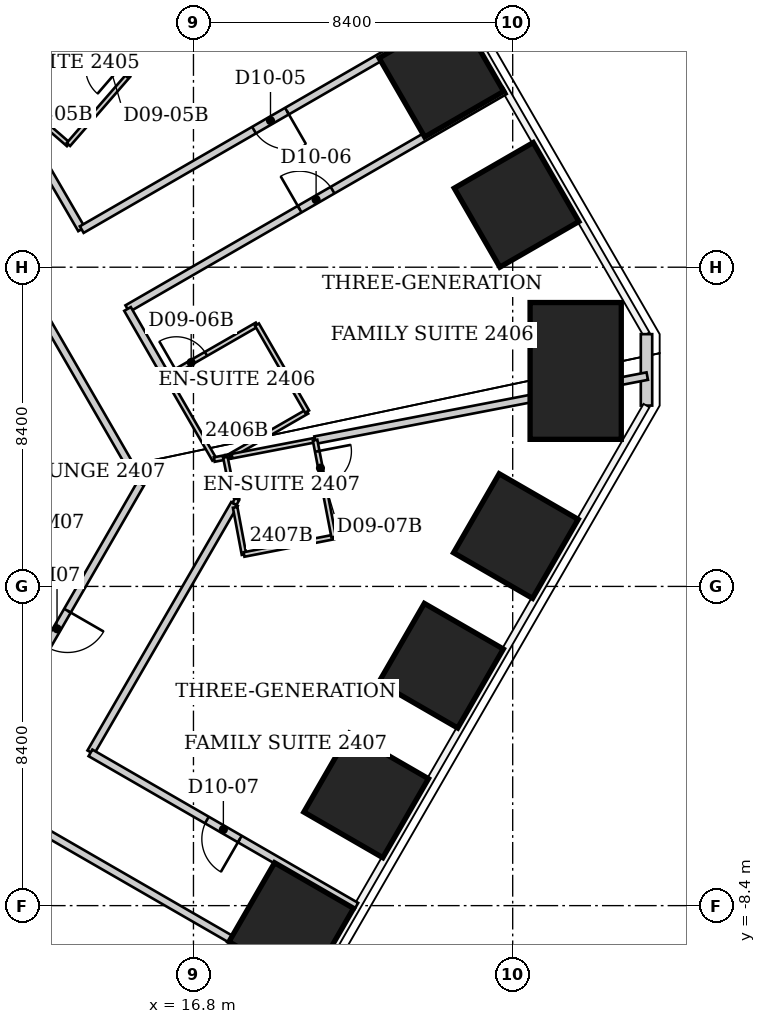
"""IFC4 building model, lengths in metres.
Left out: names, types, materials, properties, quantities, classifications, styles, units other than length and angle.
Written with IfcOpenShell. Run it as: python <this file> out.ifc"""

import sys

from ifc_helpers import new_model, si_unit, direction, frame, frame_2d, origin, origin_2d, place, context, subcontext, project, spatial, rectangle, extrude, element, fill, save


model = new_model("IFC4")
c1 = context("Model", 3, precision=1e-05, world=origin(), true_north=direction((0.0, 1.0)))
c2 = subcontext(c1, "Body", "Model", "MODEL_VIEW")
j1 = project(units=[si_unit("LENGTHUNIT", "METRE"), si_unit("PLANEANGLEUNIT", "RADIAN")], contexts=[c1])
p1 = place(None, origin())
s1 = spatial("IfcSite", under=j1, at=p1, CompositionType="ELEMENT")
p2 = place(p1, origin())
s2 = spatial("IfcBuilding", under=s1, at=p2, CompositionType="ELEMENT")
p3 = place(p2, frame((0.0, 0.0, 100.6)))
s3 = spatial("IfcBuildingStorey", under=s2, at=p3, CompositionType="ELEMENT", Elevation=100.6)
for number, where, z_axis, x_axis in (
    (1, (23.324, 13.466, 0.0), (0.0, 0.0, 1.0), (0.866, 0.5, 0.0)),
    (2, (25.302, 10.041, 0.0), (0.0, 0.0, 1.0), (0.866, 0.5, 0.0)),
):
    element("IfcColumn", number, at=place(p3, frame(where, z_axis=z_axis, x_axis=x_axis)), inside=s3, PredefinedType="COLUMN", context=c2, shape_type="SweptSolid", body=[
        extrude(rectangle(XDim=2.4, YDim=2.4, at=origin_2d()), origin(), (0.0, 0.0, 1.0), 3.8),
    ])
p4 = place(p3, frame((26.857, 5.67, 0.0), z_axis=(0.0, 0.0, 1.0), x_axis=(1.0, 0.0, 0.0)))
e3 = element("IfcColumn", 3, at=p4, inside=s3, PredefinedType="COLUMN", context=c2, shape_type="SweptSolid", body=[
    extrude(rectangle(XDim=2.4, YDim=3.6, at=origin_2d()), origin(), (0.0, 0.0, 1.0), 3.8),
])
for number, where, z_axis, x_axis in (
    (4, (25.284, 1.325, 0.0), (0.0, 0.0, 1.0), (0.866, -0.5, 0.0)),
    (5, (23.314, -2.087, 0.0), (0.0, 0.0, 1.0), (0.866, -0.5, 0.0)),
    (6, (21.344, -5.499, 0.0), (0.0, 0.0, 1.0), (0.866, -0.5, 0.0)),
    (7, (19.374, -8.911, 0.0), (0.0, 0.0, 1.0), (0.866, -0.5, 0.0)),
):
    element("IfcColumn", number, at=place(p3, frame(where, z_axis=z_axis, x_axis=x_axis)), inside=s3, PredefinedType="COLUMN", context=c2, shape_type="SweptSolid", body=[
        extrude(rectangle(XDim=2.4, YDim=2.4, at=origin_2d()), origin(), (0.0, 0.0, 1.0), 3.8),
    ])
p5 = place(p3, frame((28.721, 6.638, 0.0), z_axis=(0.0, 0.0, 1.0), x_axis=(0.0, -1.0, 0.0)))
e8 = element("IfcWall", 8, at=p5, inside=s3, PredefinedType="SOLIDWALL", context=c2, shape_type="SweptSolid", body=[
    extrude(rectangle(XDim=1.88, YDim=0.3, at=frame_2d((0.94, 0.0))), origin(), (0.0, 0.0, 1.0), 3.64),
])
p6 = place(p3, frame((11.01, 10.32, 0.0), z_axis=(0.0, 0.0, 1.0), x_axis=(0.500036278648, -0.866004457284, 0.0)))
e9 = element("IfcWall", 9, at=p6, inside=s3, PredefinedType="PARTITIONING", context=c2, shape_type="SweptSolid", body=[
    extrude(rectangle(XDim=8.799, YDim=0.2, at=frame_2d((4.399, 0.0))), origin(), (0.0, 0.0, 1.0), 3.64),
])
p7 = place(p3, frame((11.55, 13.33, 0.0), z_axis=(0.0, 0.0, 1.0), x_axis=(0.653238965593, 0.75715180369, 0.0)))
e10 = element("IfcWall", 10, at=p7, inside=s3, PredefinedType="PARTITIONING", context=c2, shape_type="SweptSolid", body=[
    extrude(rectangle(XDim=2.404, YDim=0.12, at=frame_2d((1.202, 0.0))), origin(), (0.0, 0.0, 1.0), 3.64),
])
p8 = place(p3, frame((11.55, 13.33, 0.0), z_axis=(0.0, 0.0, 1.0), x_axis=(0.755437535555, -0.655220672655, 0.0)))
e11 = element("IfcWall", 11, at=p8, inside=s3, PredefinedType="PARTITIONING", context=c2, shape_type="SweptSolid", body=[
    extrude(rectangle(XDim=2.594, YDim=0.12, at=frame_2d((1.297, 0.0))), origin(), (0.0, 0.0, 1.0), 3.64),
])
p9 = place(p3, frame((12.899, -6.465, 0.0), z_axis=(0.0, 0.0, 1.0), x_axis=(0.866184578051, -0.499724200681, 0.0)))
e12 = element("IfcWall", 12, at=p9, inside=s3, PredefinedType="PARTITIONING", context=c2, shape_type="SweptSolid", body=[
    extrude(rectangle(XDim=8.064, YDim=0.2, at=frame_2d((4.032, 0.0))), origin(), (0.0, 0.0, 1.0), 3.64),
])
p10 = place(p3, frame((13.51, 11.63, 0.0), z_axis=(0.0, 0.0, 1.0), x_axis=(0.655566599468, 0.75513736079, 0.0)))
e13 = element("IfcWall", 13, at=p10, inside=s3, PredefinedType="PARTITIONING", context=c2, shape_type="SweptSolid", body=[
    extrude(rectangle(XDim=2.41, YDim=0.12, at=frame_2d((1.205, 0.0))), origin(), (0.0, 0.0, 1.0), 3.64),
])
p11 = place(p3, frame((13.855, 9.399, 0.0), z_axis=(0.0, 0.0, 1.0), x_axis=(-0.502087259191, 0.864816965698, 0.0)))
e14 = element("IfcWall", 14, at=p11, inside=s3, PredefinedType="PARTITIONING", context=c2, shape_type="SweptSolid", body=[
    extrude(rectangle(XDim=4.028, YDim=0.2, at=frame_2d((2.014, 0.0))), origin(), (0.0, 0.0, 1.0), 3.64),
])
p12 = place(p3, frame((14.097, -4.367, 0.0), z_axis=(0.0, 0.0, 1.0), x_axis=(0.500859137679, 0.865528811885, 0.0)))
e15 = element("IfcWall", 15, at=p12, inside=s3, PredefinedType="PARTITIONING", context=c2, shape_type="SweptSolid", body=[
    extrude(rectangle(XDim=7.552, YDim=0.2, at=frame_2d((3.776, 0.0))), origin(), (0.0, 0.0, 1.0), 3.64),
])
p13 = place(p3, frame((15.06, 7.31, 0.0), z_axis=(0.0, 0.0, 1.0), x_axis=(0.866042039906, 0.499971184285, 0.0)))
e16 = element("IfcWall", 16, at=p13, inside=s3, PredefinedType="PARTITIONING", context=c2, shape_type="SweptSolid", body=[
    extrude(rectangle(XDim=11.47, YDim=0.2, at=frame_2d((5.735, 0.0))), origin(), (0.0, 0.0, 1.0), 3.64),
])
p14 = place(p13, frame((5.235, 0.0, 0.0)))
e17 = element("IfcOpeningElement", 17, at=p14, cuts=e16, PredefinedType="OPENING", context=c2, shape_type="SweptSolid", body=[
    extrude(rectangle(XDim=1.0, YDim=2.13, at=frame_2d((0.5, 1.065))), frame((0.0, 0.1, 0.0), z_axis=(0.0, -1.0, 0.0), x_axis=(1.0, 0.0, 0.0)), (0.0, 0.0, 1.0), 0.2),
])
p15 = place(p3, frame((15.065, 7.301, 0.0), z_axis=(0.0, 0.0, 1.0), x_axis=(0.498810334238, -0.866711168993, 0.0)))
e18 = element("IfcWall", 18, at=p15, inside=s3, PredefinedType="PARTITIONING", context=c2, shape_type="SweptSolid", body=[
    extrude(rectangle(XDim=2.055, YDim=0.2, at=frame_2d((1.028, 0.0))), origin(), (0.0, 0.0, 1.0), 3.64),
])
p16 = place(p3, frame((15.09, 13.45, 0.0), z_axis=(0.0, 0.0, 1.0), x_axis=(-0.757086659925, 0.653314464377, 0.0)))
e19 = element("IfcWall", 19, at=p16, inside=s3, PredefinedType="PARTITIONING", context=c2, shape_type="SweptSolid", body=[
    extrude(rectangle(XDim=2.602, YDim=0.12, at=frame_2d((1.301, 0.0))), origin(), (0.0, 0.0, 1.0), 3.64),
])
p17 = place(p16, frame((0.3, 0.0, 0.0)))
e20 = element("IfcOpeningElement", 20, at=p17, cuts=e19, PredefinedType="OPENING", context=c2, shape_type="SweptSolid", body=[
    extrude(rectangle(XDim=0.9, YDim=2.03, at=frame_2d((0.45, 1.015))), frame((0.0, 0.06, 0.0), z_axis=(0.0, -1.0, 0.0), x_axis=(1.0, 0.0, 0.0)), (0.0, 0.0, 1.0), 0.12),
])
p18 = place(p3, frame((15.41, 2.7, 0.0), z_axis=(0.0, 0.0, 1.0), x_axis=(-0.499556067326, -0.866281556769, 0.0)))
e21 = element("IfcWall", 21, at=p18, inside=s3, PredefinedType="PARTITIONING", context=c2, shape_type="SweptSolid", body=[
    extrude(rectangle(XDim=8.808, YDim=0.2, at=frame_2d((4.404, 0.0))), origin(), (0.0, 0.0, 1.0), 3.64),
])
p19 = place(p18, frame((3.854, 0.0, 0.0)))
e22 = element("IfcOpeningElement", 22, at=p19, cuts=e21, PredefinedType="OPENING", context=c2, shape_type="SweptSolid", body=[
    extrude(rectangle(XDim=1.1, YDim=2.2, at=frame_2d((0.55, 1.1))), frame((0.0, 0.1, 0.0), z_axis=(0.0, -1.0, 0.0), x_axis=(1.0, 0.0, 0.0)), (0.0, 0.0, 1.0), 0.2),
])
p20 = place(p3, frame((16.09, 5.52, 0.0), z_axis=(0.0, 0.0, 1.0), x_axis=(0.500424596343, -0.865780124151, 0.0)))
e23 = element("IfcWall", 23, at=p20, inside=s3, PredefinedType="PARTITIONING", context=c2, shape_type="SweptSolid", body=[
    extrude(rectangle(XDim=2.518, YDim=0.12, at=frame_2d((1.259, 0.0))), origin(), (0.0, 0.0, 1.0), 3.64),
])
p21 = place(p3, frame((17.582, 3.384, 0.0), z_axis=(0.0, 0.0, 1.0), x_axis=(-0.982006446981, -0.18884739365, 0.0)))
e24 = element("IfcWall", 24, at=p21, inside=s3, PredefinedType="PARTITIONING", context=c2, shape_type="SweptSolid", body=[
    extrude(rectangle(XDim=0.239, YDim=0.12, at=frame_2d((0.12, 0.0))), origin(), (0.0, 0.0, 1.0), 3.64),
])
p22 = place(p3, frame((17.64, 3.4, 0.0), z_axis=(0.0, 0.0, 1.0), x_axis=(0.988371697651, 0.152057184254, 0.0)))
e25 = element("IfcWall", 25, at=p22, inside=s3, PredefinedType="PARTITIONING", context=c2, shape_type="SweptSolid", body=[
    extrude(rectangle(XDim=0.132, YDim=0.12, at=frame_2d((0.066, 0.0))), origin(), (0.0, 0.0, 1.0), 3.64),
])
p23 = place(p3, frame((17.72, 2.7, 0.0), z_axis=(0.0, 0.0, 1.0), x_axis=(0.498530782172, -0.866871997025, 0.0)))
e26 = element("IfcWall", 26, at=p23, inside=s3, PredefinedType="PARTITIONING", context=c2, shape_type="SweptSolid", body=[
    extrude(rectangle(XDim=0.461, YDim=0.12, at=frame_2d((0.231, 0.0))), origin(), (0.0, 0.0, 1.0), 3.64),
])
p24 = place(p3, frame((17.76, 3.43, 0.0), z_axis=(0.0, 0.0, 1.0), x_axis=(0.866371132283, 0.499400701988, 0.0)))
e27 = element("IfcWall", 27, at=p24, inside=s3, PredefinedType="PARTITIONING", context=c2, shape_type="SweptSolid", body=[
    extrude(rectangle(XDim=2.343, YDim=0.12, at=frame_2d((1.172, 0.0))), origin(), (0.0, 0.0, 1.0), 3.64),
])
p25 = place(p3, frame((17.774, 2.731, 0.0), z_axis=(0.0, 0.0, 1.0), x_axis=(-0.196253874553, 0.980553117747, 0.0)))
e28 = element("IfcWall", 28, at=p25, inside=s3, PredefinedType="PARTITIONING", context=c2, shape_type="SweptSolid", body=[
    extrude(rectangle(XDim=0.682, YDim=0.12, at=frame_2d((0.341, 0.0))), origin(), (0.0, 0.0, 1.0), 3.64),
])
p26 = place(p3, frame((17.814, 3.428, 0.0), z_axis=(0.0, 0.0, 1.0), x_axis=(0.981899119444, 0.189404644173, 0.0)))
e29 = element("IfcWall", 29, at=p26, inside=s3, PredefinedType="PARTITIONING", context=c2, shape_type="SweptSolid", body=[
    extrude(rectangle(XDim=2.226, YDim=0.12, at=frame_2d((1.113, 0.0))), origin(), (0.0, 0.0, 1.0), 3.64),
])
p27 = place(p3, frame((17.88, 2.17, 0.0), z_axis=(0.0, 0.0, 1.0), x_axis=(0.474099823035, 0.880471099922, 0.0)))
e30 = element("IfcWall", 30, at=p27, inside=s3, PredefinedType="PARTITIONING", context=c2, shape_type="SweptSolid", body=[
    extrude(rectangle(XDim=0.148, YDim=0.12, at=frame_2d((0.074, 0.0))), origin(), (0.0, 0.0, 1.0), 3.64),
])
p28 = place(p3, frame((17.897, 2.082, 0.0), z_axis=(0.0, 0.0, 1.0), x_axis=(0.184580266957, -0.982817442382, 0.0)))
e31 = element("IfcWall", 31, at=p28, inside=s3, PredefinedType="PARTITIONING", context=c2, shape_type="SweptSolid", body=[
    extrude(rectangle(XDim=1.263, YDim=0.12, at=frame_2d((0.632, 0.0))), origin(), (0.0, 0.0, 1.0), 3.64),
])
p29 = place(p3, frame((18.13, 0.84, 0.0), z_axis=(0.0, 0.0, 1.0), x_axis=(0.981533392326, 0.191290877329, 0.0)))
e32 = element("IfcWall", 32, at=p29, inside=s3, PredefinedType="PARTITIONING", context=c2, shape_type="SweptSolid", body=[
    extrude(rectangle(XDim=2.405, YDim=0.12, at=frame_2d((1.202, 0.0))), origin(), (0.0, 0.0, 1.0), 3.64),
])
p30 = place(p3, frame((18.47, 6.89, 0.0), z_axis=(0.0, 0.0, 1.0), x_axis=(-0.866679536557, -0.498865293355, 0.0)))
e33 = element("IfcWall", 33, at=p30, inside=s3, PredefinedType="PARTITIONING", context=c2, shape_type="SweptSolid", body=[
    extrude(rectangle(XDim=2.746, YDim=0.12, at=frame_2d((1.373, 0.0))), origin(), (0.0, 0.0, 1.0), 3.64),
])
p31 = place(p30, frame((1.546, 0.0, 0.0)))
e34 = element("IfcOpeningElement", 34, at=p31, cuts=e33, PredefinedType="OPENING", context=c2, shape_type="SweptSolid", body=[
    extrude(rectangle(XDim=0.9, YDim=2.03, at=frame_2d((0.45, 1.015))), frame((0.0, 0.06, 0.0), z_axis=(0.0, -1.0, 0.0), x_axis=(1.0, 0.0, 0.0)), (0.0, 0.0, 1.0), 0.12),
])
p32 = place(p3, frame((19.79, 4.6, 0.0), z_axis=(0.0, 0.0, 1.0), x_axis=(-0.499447879564, 0.866343936089, 0.0)))
e35 = element("IfcWall", 35, at=p32, inside=s3, PredefinedType="PARTITIONING", context=c2, shape_type="SweptSolid", body=[
    extrude(rectangle(XDim=2.643, YDim=0.12, at=frame_2d((1.322, 0.0))), origin(), (0.0, 0.0, 1.0), 3.64),
])
p33 = place(p3, frame((20.0, 3.85, 0.0), z_axis=(0.0, 0.0, 1.0), x_axis=(0.981934187141, 0.189222757942, 0.0)))
e36 = element("IfcWall", 36, at=p33, inside=s3, PredefinedType="PARTITIONING", context=c2, shape_type="SweptSolid", body=[
    extrude(rectangle(XDim=8.901, YDim=0.2, at=frame_2d((4.451, 0.0))), origin(), (0.0, 0.0, 1.0), 3.64),
])
p34 = place(p3, frame((20.49, 1.3, 0.0), z_axis=(0.0, 0.0, 1.0), x_axis=(-0.188697442844, 0.982035271802, 0.0)))
e37 = element("IfcWall", 37, at=p34, inside=s3, PredefinedType="PARTITIONING", context=c2, shape_type="SweptSolid", body=[
    extrude(rectangle(XDim=2.597, YDim=0.12, at=frame_2d((1.298, 0.0))), origin(), (0.0, 0.0, 1.0), 3.64),
])
p35 = place(p34, frame((1.397, 0.0, 0.0)))
e38 = element("IfcOpeningElement", 38, at=p35, cuts=e37, PredefinedType="OPENING", context=c2, shape_type="SweptSolid", body=[
    extrude(rectangle(XDim=0.9, YDim=2.03, at=frame_2d((0.45, 1.015))), frame((0.0, 0.06, 0.0), z_axis=(0.0, -1.0, 0.0), x_axis=(1.0, 0.0, 0.0)), (0.0, 0.0, 1.0), 0.12),
])
p36 = place(p3, frame((21.084, -8.415, 0.0), z_axis=(0.0, 0.0, 1.0), x_axis=(-0.866174008169, 0.499742521277, 0.0)))
e39 = element("IfcWall", 39, at=p36, inside=s3, PredefinedType="PARTITIONING", context=c2, shape_type="SweptSolid", body=[
    extrude(rectangle(XDim=8.074, YDim=0.2, at=frame_2d((4.037, 0.0))), origin(), (0.0, 0.0, 1.0), 3.64),
])
p37 = place(p36, frame((3.537, 0.0, 0.0)))
e40 = element("IfcOpeningElement", 40, at=p37, cuts=e39, PredefinedType="OPENING", context=c2, shape_type="SweptSolid", body=[
    extrude(rectangle(XDim=1.0, YDim=2.13, at=frame_2d((0.5, 1.065))), frame((0.0, 0.1, 0.0), z_axis=(0.0, -1.0, 0.0), x_axis=(1.0, 0.0, 0.0)), (0.0, 0.0, 1.0), 0.2),
])
p38 = place(p3, frame((23.794, 15.125, 0.0), z_axis=(0.0, 0.0, 1.0), x_axis=(-0.866032823784, -0.499987147964, 0.0)))
e41 = element("IfcWall", 41, at=p38, inside=s3, PredefinedType="PARTITIONING", context=c2, shape_type="SweptSolid", body=[
    extrude(rectangle(XDim=11.47, YDim=0.2, at=frame_2d((5.735, 0.0))), origin(), (0.0, 0.0, 1.0), 3.64),
])
p39 = place(p38, frame((5.235, 0.0, 0.0)))
e42 = element("IfcOpeningElement", 42, at=p39, cuts=e41, PredefinedType="OPENING", context=c2, shape_type="SweptSolid", body=[
    extrude(rectangle(XDim=1.0, YDim=2.13, at=frame_2d((0.5, 1.065))), frame((0.0, 0.1, 0.0), z_axis=(0.0, -1.0, 0.0), x_axis=(1.0, 0.0, 0.0)), (0.0, 0.0, 1.0), 0.2),
])
p40 = place(p39, origin())
e43 = element("IfcDoor", 43, at=p40, inside=s3, OperationType="SINGLE_SWING_LEFT", PredefinedType="DOOR", context=c2, shape_type="SweptSolid", body=[
    extrude(rectangle(XDim=1.0, YDim=2.13, at=frame_2d((0.5, 1.065))), frame((0.0, 0.025, 0.0), z_axis=(0.0, -1.0, 0.0), x_axis=(1.0, 0.0, 0.0)), (0.0, 0.0, 1.0), 0.05),
])
fill(e42, e43)
p41 = place(p17, origin())
e44 = element("IfcDoor", 44, at=p41, inside=s3, OperationType="SINGLE_SWING_LEFT", PredefinedType="DOOR", context=c2, shape_type="SweptSolid", body=[
    extrude(rectangle(XDim=0.9, YDim=2.03, at=frame_2d((0.45, 1.015))), frame((0.0, 0.025, 0.0), z_axis=(0.0, -1.0, 0.0), x_axis=(1.0, 0.0, 0.0)), (0.0, 0.0, 1.0), 0.05),
])
fill(e20, e44)
p42 = place(p14, origin())
e45 = element("IfcDoor", 45, at=p42, inside=s3, OperationType="SINGLE_SWING_LEFT", PredefinedType="DOOR", context=c2, shape_type="SweptSolid", body=[
    extrude(rectangle(XDim=1.0, YDim=2.13, at=frame_2d((0.5, 1.065))), frame((0.0, 0.025, 0.0), z_axis=(0.0, -1.0, 0.0), x_axis=(1.0, 0.0, 0.0)), (0.0, 0.0, 1.0), 0.05),
])
fill(e17, e45)
p43 = place(p31, origin())
e46 = element("IfcDoor", 46, at=p43, inside=s3, OperationType="SINGLE_SWING_RIGHT", PredefinedType="DOOR", context=c2, shape_type="SweptSolid", body=[
    extrude(rectangle(XDim=0.9, YDim=2.03, at=frame_2d((0.45, 1.015))), frame((0.0, 0.025, 0.0), z_axis=(0.0, -1.0, 0.0), x_axis=(1.0, 0.0, 0.0)), (0.0, 0.0, 1.0), 0.05),
])
fill(e34, e46)
p44 = place(p37, origin())
e47 = element("IfcDoor", 47, at=p44, inside=s3, OperationType="SINGLE_SWING_LEFT", PredefinedType="DOOR", context=c2, shape_type="SweptSolid", body=[
    extrude(rectangle(XDim=1.0, YDim=2.13, at=frame_2d((0.5, 1.065))), frame((0.0, 0.025, 0.0), z_axis=(0.0, -1.0, 0.0), x_axis=(1.0, 0.0, 0.0)), (0.0, 0.0, 1.0), 0.05),
])
fill(e40, e47)
p45 = place(p35, origin())
e48 = element("IfcDoor", 48, at=p45, inside=s3, OperationType="SINGLE_SWING_RIGHT", PredefinedType="DOOR", context=c2, shape_type="SweptSolid", body=[
    extrude(rectangle(XDim=0.9, YDim=2.03, at=frame_2d((0.45, 1.015))), frame((0.0, 0.025, 0.0), z_axis=(0.0, -1.0, 0.0), x_axis=(1.0, 0.0, 0.0)), (0.0, 0.0, 1.0), 0.05),
])
fill(e38, e48)
p46 = place(p19, origin())
e49 = element("IfcDoor", 49, at=p46, inside=s3, OperationType="SINGLE_SWING_LEFT", PredefinedType="DOOR", context=c2, shape_type="SweptSolid", body=[
    extrude(rectangle(XDim=1.1, YDim=2.2, at=frame_2d((0.55, 1.1))), frame((0.0, 0.025, 0.0), z_axis=(0.0, -1.0, 0.0), x_axis=(1.0, 0.0, 0.0)), (0.0, 0.0, 1.0), 0.05),
])
fill(e22, e49)
save(model, sys.argv[1])
